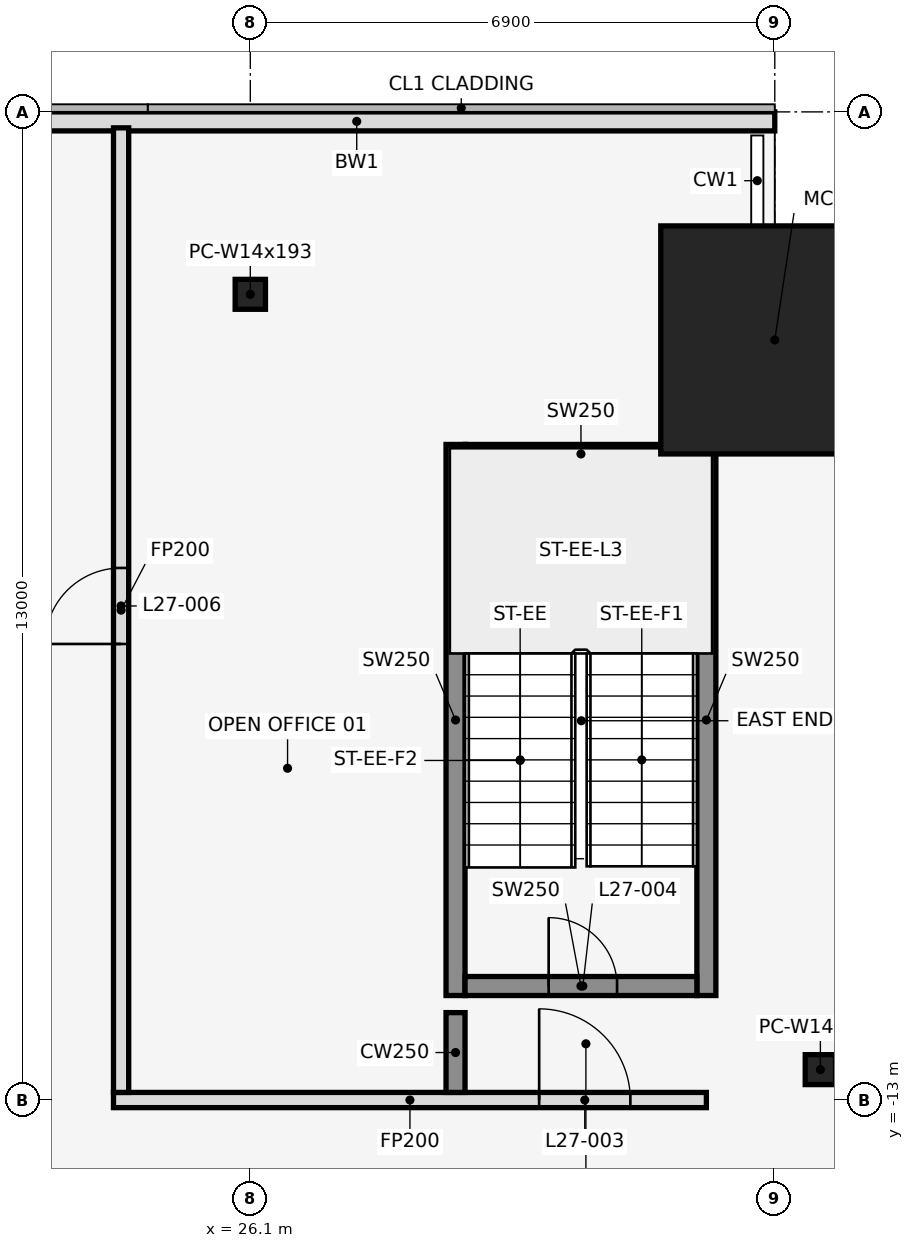
"""IFC4 building model, lengths in metres.
Left out: names, types, materials, properties, quantities, classifications, styles, units other than length and angle.
Written with IfcOpenShell. Run it as: python <this file> out.ifc"""

import sys

from ifc_helpers import new_model, si_unit, direction, frame, frame_2d, origin, origin_2d, place, context, subcontext, project, spatial, rectangle, hollow_rectangle, i_section, extrude, element, fill, save


model = new_model("IFC4")
c1 = context("Model", 3, precision=1e-05, world=origin(), true_north=direction((0.0, 1.0)))
c2 = subcontext(c1, "Body", "Model", "MODEL_VIEW")
j1 = project(units=[si_unit("LENGTHUNIT", "METRE"), si_unit("PLANEANGLEUNIT", "RADIAN")], contexts=[c1])
p1 = place(None, origin())
s1 = spatial("IfcSite", under=j1, at=p1, CompositionType="ELEMENT")
p2 = place(p1, origin())
s2 = spatial("IfcBuilding", under=s1, at=p2, CompositionType="ELEMENT")
p3 = place(p2, frame((0.0, 0.0, 126.8)))
s3 = spatial("IfcBuildingStorey", under=s2, at=p3, CompositionType="ELEMENT", Elevation=126.8)
p4 = place(p3, frame((26.1, -2.4, 0.0), z_axis=(0.0, 0.0, 1.0), x_axis=(1.0, 0.0, 0.0)))
e1 = element("IfcColumn", 1, at=p4, inside=s3, PredefinedType="COLUMN", context=c2, shape_type="SweptSolid", body=[
    extrude(i_section(OverallWidth=0.399, OverallDepth=0.394, WebThickness=0.023, FlangeThickness=0.037, at=origin_2d()), origin(), (0.0, 0.0, 1.0), 4.1),
])
p5 = place(p3, frame((33.0, -3.0, 0.0), z_axis=(0.0, 0.0, 1.0), x_axis=(1.0, 0.0, 0.0)))
e2 = element("IfcColumn", 2, at=p5, inside=s3, PredefinedType="COLUMN", context=c2, shape_type="SweptSolid", body=[
    extrude(hollow_rectangle(XDim=3.0, YDim=3.0, WallThickness=0.09, at=origin_2d()), origin(), (0.0, 0.0, 1.0), 4.1),
])
p6 = place(p3, frame((33.6, -12.6, 0.0), z_axis=(0.0, 0.0, 1.0), x_axis=(1.0, 0.0, 0.0)))
e3 = element("IfcColumn", 3, at=p6, inside=s3, PredefinedType="COLUMN", context=c2, shape_type="SweptSolid", body=[
    extrude(i_section(OverallWidth=0.399, OverallDepth=0.394, WebThickness=0.023, FlangeThickness=0.037, at=origin_2d()), origin(), (0.0, 0.0, 1.0), 4.1),
])
p7 = place(p3, frame((33.0, -0.125, 0.0), z_axis=(0.0, 0.0, 1.0), x_axis=(-1.0, 0.0, 0.0)))
e4 = element("IfcWall", 4, at=p7, inside=s3, PredefinedType="STANDARD", context=c2, shape_type="SweptSolid", body=[
    extrude(rectangle(XDim=11.0, YDim=0.25, at=frame_2d((5.5, 0.0))), origin(), (0.0, 0.0, 1.0), 3.95),
])
for number, where, z_axis, x_axis in (
    (5, (28.8, -11.625, 0.0), (0.0, 0.0, 1.0), (0.0, 1.0, 0.0)),
    (6, (32.1, -11.625, 0.0), (0.0, 0.0, 1.0), (0.0, 1.0, 0.0)),
):
    element("IfcWall", number, at=place(p3, frame(where, z_axis=z_axis, x_axis=x_axis)), inside=s3, PredefinedType="SHEAR", context=c2, shape_type="SweptSolid", body=[
        extrude(rectangle(XDim=7.25, YDim=0.25, at=frame_2d((3.625, 0.0))), origin(), (0.0, 0.0, 1.0), 4.1),
    ])
p8 = place(p3, frame((28.925, -11.5, 0.0), z_axis=(0.0, 0.0, 1.0), x_axis=(1.0, 0.0, 0.0)))
e7 = element("IfcWall", 7, at=p8, inside=s3, PredefinedType="SHEAR", context=c2, shape_type="SweptSolid", body=[
    extrude(rectangle(XDim=3.05, YDim=0.25, at=frame_2d((1.525, 0.0))), origin(), (0.0, 0.0, 1.0), 4.1),
])
p9 = place(p8, frame((1.1, 0.0, 0.0)))
e8 = element("IfcOpeningElement", 8, at=p9, cuts=e7, PredefinedType="OPENING", context=c2, shape_type="SweptSolid", body=[
    extrude(rectangle(XDim=0.9, YDim=2.1, at=frame_2d((0.45, 1.05))), frame((0.0, 0.137, 0.0), z_axis=(0.0, -1.0, 0.0), x_axis=(1.0, 0.0, 0.0)), (0.0, 0.0, 1.0), 0.274),
])
p10 = place(p3, frame((28.925, -4.5, 0.0), z_axis=(0.0, 0.0, 1.0), x_axis=(1.0, 0.0, 0.0)))
e9 = element("IfcWall", 9, at=p10, inside=s3, PredefinedType="SHEAR", context=c2, shape_type="SweptSolid", body=[
    extrude(rectangle(XDim=3.05, YDim=0.25, at=frame_2d((1.525, 0.0))), origin(), (0.0, 0.0, 1.0), 4.1),
])
p11 = place(p3, frame((24.3, -13.0, 0.0), z_axis=(0.0, 0.0, 1.0), x_axis=(1.0, 0.0, 0.0)))
e10 = element("IfcWall", 10, at=p11, inside=s3, PredefinedType="PARTITIONING", context=c2, shape_type="SweptSolid", body=[
    extrude(rectangle(XDim=7.8, YDim=0.2, at=frame_2d((3.9, 0.0))), origin(), (0.0, 0.0, 1.0), 2.939),
])
p12 = place(p11, frame((5.6, 0.0, 0.0)))
e11 = element("IfcOpeningElement", 11, at=p12, cuts=e10, PredefinedType="OPENING", context=c2, shape_type="SweptSolid", body=[
    extrude(rectangle(XDim=1.2, YDim=2.1, at=frame_2d((0.6, 1.05))), frame((0.0, 0.112, 0.0), z_axis=(0.0, -1.0, 0.0), x_axis=(1.0, 0.0, 0.0)), (0.0, 0.0, 1.0), 0.224),
])
p13 = place(p3, frame((24.4, -12.9, 0.0), z_axis=(0.0, 0.0, 1.0), x_axis=(0.0, 1.0, 0.0)))
e12 = element("IfcWall", 12, at=p13, inside=s3, PredefinedType="PARTITIONING", context=c2, shape_type="SweptSolid", body=[
    extrude(rectangle(XDim=12.69, YDim=0.2, at=frame_2d((6.345, 0.0))), origin(), (0.0, 0.0, 1.0), 2.939),
])
p14 = place(p13, frame((5.9, 0.0, 0.0)))
e13 = element("IfcOpeningElement", 13, at=p14, cuts=e12, PredefinedType="OPENING", context=c2, shape_type="SweptSolid", body=[
    extrude(rectangle(XDim=1.0, YDim=2.1, at=frame_2d((0.5, 1.05))), frame((0.0, 0.112, 0.0), z_axis=(0.0, -1.0, 0.0), x_axis=(1.0, 0.0, 0.0)), (0.0, 0.0, 1.0), 0.224),
])
p15 = place(p3, frame((28.8, -12.9, 0.0), z_axis=(0.0, 0.0, 1.0), x_axis=(0.0, 1.0, 0.0)))
e14 = element("IfcWall", 14, at=p15, inside=s3, PredefinedType="SHEAR", context=c2, shape_type="SweptSolid", body=[
    extrude(rectangle(XDim=1.05, YDim=0.25, at=frame_2d((0.525, 0.0))), origin(), (0.0, 0.0, 1.0), 4.1),
])
p16 = place(p12, origin())
e15 = element("IfcDoor", 15, at=p16, inside=s3, OperationType="SINGLE_SWING_RIGHT", PredefinedType="DOOR", context=c2, shape_type="SweptSolid", body=[
    extrude(rectangle(XDim=1.2, YDim=2.1, at=frame_2d((0.6, 1.05))), frame((0.0, 0.025, 0.0), z_axis=(0.0, -1.0, 0.0), x_axis=(1.0, 0.0, 0.0)), (0.0, 0.0, 1.0), 0.05),
])
fill(e11, e15)
p17 = place(p9, origin())
e16 = element("IfcDoor", 16, at=p17, inside=s3, OperationType="SINGLE_SWING_LEFT", PredefinedType="DOOR", context=c2, shape_type="SweptSolid", body=[
    extrude(rectangle(XDim=0.9, YDim=2.1, at=frame_2d((0.45, 1.05))), frame((0.0, 0.025, 0.0), z_axis=(0.0, -1.0, 0.0), x_axis=(1.0, 0.0, 0.0)), (0.0, 0.0, 1.0), 0.05),
])
fill(e8, e16)
p18 = place(p14, frame((1.0, 0.0, 0.0), z_axis=(0.0, 0.0, 1.0), x_axis=(-1.0, 0.0, 0.0)))
e17 = element("IfcDoor", 17, at=p18, inside=s3, OperationType="SINGLE_SWING_RIGHT", PredefinedType="DOOR", context=c2, shape_type="SweptSolid", body=[
    extrude(rectangle(XDim=1.0, YDim=2.1, at=frame_2d((0.5, 1.05))), frame((0.0, 0.025, 0.0), z_axis=(0.0, -1.0, 0.0), x_axis=(1.0, 0.0, 0.0)), (0.0, 0.0, 1.0), 0.05),
])
fill(e13, e17)
save(model, sys.argv[1])
